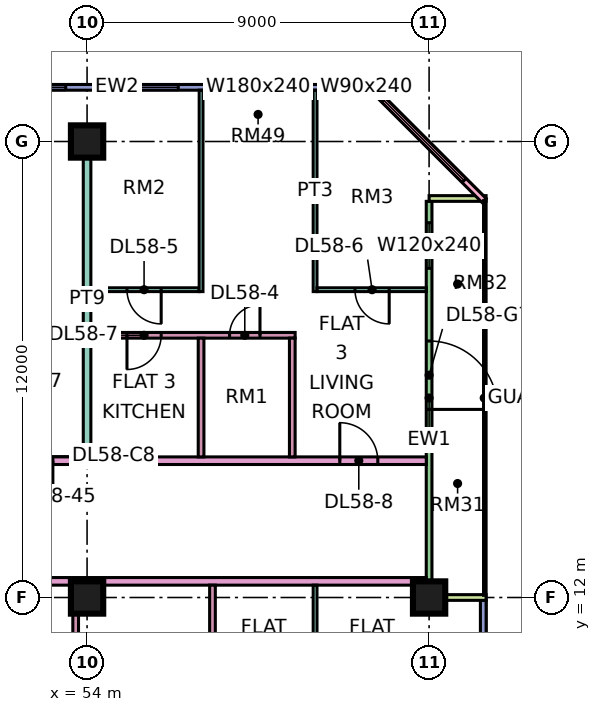
"""IFC4 building model, lengths in metres.
Left out: names, types, materials, properties, quantities, classifications, styles, units other than length and angle.
Written with IfcOpenShell. Run it as: python <this file> out.ifc"""

import sys

from ifc_helpers import new_model, si_unit, direction, frame, frame_2d, origin, origin_2d, place, context, subcontext, project, spatial, rectangle, extrude, element, fill, save


model = new_model("IFC4")
c1 = context("Model", 3, precision=1e-05, world=origin(), true_north=direction((0.0, 1.0)))
c2 = subcontext(c1, "Body", "Model", "MODEL_VIEW")
j1 = project(units=[si_unit("LENGTHUNIT", "METRE"), si_unit("PLANEANGLEUNIT", "RADIAN")], contexts=[c1])
p1 = place(None, origin())
s1 = spatial("IfcSite", under=j1, at=p1, CompositionType="ELEMENT")
p2 = place(p1, origin())
s2 = spatial("IfcBuilding", under=s1, at=p2, CompositionType="ELEMENT")
p3 = place(p2, frame((0.0, 0.0, 245.4)))
s3 = spatial("IfcBuildingStorey", under=s2, at=p3, CompositionType="ELEMENT", Elevation=245.4)
for number, where, z_axis, x_axis in (
    (1, (54.0, 12.0, 0.0), (0.0, 0.0, 1.0), (1.0, 0.0, 0.0)),
    (2, (54.0, 24.0, 0.0), (0.0, 0.0, 1.0), (1.0, 0.0, 0.0)),
    (3, (63.0, 12.0, 0.0), (0.0, 0.0, 1.0), (1.0, 0.0, 0.0)),
):
    element("IfcColumn", number, at=place(p3, frame(where, z_axis=z_axis, x_axis=x_axis)), inside=s3, PredefinedType="COLUMN", context=c2, shape_type="SweptSolid", body=[
        extrude(rectangle(XDim=0.85, YDim=0.85, at=origin_2d()), origin(), (0.0, 0.0, 1.0), 3.75),
    ])
p4 = place(p3, frame((61.5, 25.425, 0.0), z_axis=(0.0, 0.0, 1.0), x_axis=(-1.0, 0.0, 0.0)))
e4 = element("IfcWall", 4, at=p4, inside=s3, PredefinedType="SOLIDWALL", context=c2, shape_type="SweptSolid", body=[
    extrude(rectangle(XDim=13.425, YDim=0.15, at=frame_2d((6.712, 0.0))), origin(), (0.0, 0.0, 1.0), 3.35),
])
p5 = place(p4, frame((0.3, 0.0, 0.45)))
e5 = element("IfcOpeningElement", 5, at=p5, cuts=e4, PredefinedType="OPENING", context=c2, shape_type="SweptSolid", body=[
    extrude(rectangle(XDim=0.9, YDim=2.4, at=frame_2d((0.45, 1.2))), frame((0.0, 0.085, 0.0), z_axis=(0.0, -1.0, 0.0), x_axis=(1.0, 0.0, 0.0)), (0.0, 0.0, 1.0), 0.17),
])
p6 = place(p4, frame((2.1, 0.0, 0.45)))
e6 = element("IfcOpeningElement", 6, at=p6, cuts=e4, PredefinedType="OPENING", context=c2, shape_type="SweptSolid", body=[
    extrude(rectangle(XDim=1.8, YDim=2.4, at=frame_2d((0.9, 1.2))), frame((0.0, 0.085, 0.0), z_axis=(0.0, -1.0, 0.0), x_axis=(1.0, 0.0, 0.0)), (0.0, 0.0, 1.0), 0.17),
])
p7 = place(p4, frame((5.1, 0.0, 0.45)))
e7 = element("IfcOpeningElement", 7, at=p7, cuts=e4, PredefinedType="OPENING", context=c2, shape_type="SweptSolid", body=[
    extrude(rectangle(XDim=1.8, YDim=2.4, at=frame_2d((0.9, 1.2))), frame((0.0, 0.085, 0.0), z_axis=(0.0, -1.0, 0.0), x_axis=(1.0, 0.0, 0.0)), (0.0, 0.0, 1.0), 0.17),
])
p8 = place(p4, frame((8.062, 0.0, 0.45)))
e8 = element("IfcOpeningElement", 8, at=p8, cuts=e4, PredefinedType="OPENING", context=c2, shape_type="SweptSolid", body=[
    extrude(rectangle(XDim=4.8, YDim=2.4, at=frame_2d((2.4, 1.2))), frame((0.0, 0.085, 0.0), z_axis=(0.0, -1.0, 0.0), x_axis=(1.0, 0.0, 0.0)), (0.0, 0.0, 1.0), 0.17),
])
p9 = place(p3, frame((64.425, 1.5, 0.0), z_axis=(0.0, 0.0, 1.0), x_axis=(0.0, 1.0, 0.0)))
e9 = element("IfcWall", 9, at=p9, inside=s3, PredefinedType="SOLIDWALL", context=c2, shape_type="SweptSolid", body=[
    extrude(rectangle(XDim=10.425, YDim=0.15, at=frame_2d((5.212, 0.0))), origin(), (0.0, 0.0, 1.0), 3.35),
])
p10 = place(p9, frame((0.663, 0.0, 0.45)))
e10 = element("IfcOpeningElement", 10, at=p10, cuts=e9, PredefinedType="OPENING", context=c2, shape_type="SweptSolid", body=[
    extrude(rectangle(XDim=4.8, YDim=2.4, at=frame_2d((2.4, 1.2))), frame((0.0, 0.085, 0.0), z_axis=(0.0, -1.0, 0.0), x_axis=(1.0, 0.0, 0.0)), (0.0, 0.0, 1.0), 0.17),
])
p11 = place(p3, frame((63.0, 12.075, 0.0), z_axis=(0.0, 0.0, 1.0), x_axis=(0.0, 1.0, 0.0)))
e11 = element("IfcWall", 11, at=p11, inside=s3, PredefinedType="SOLIDWALL", context=c2, shape_type="SweptSolid", body=[
    extrude(rectangle(XDim=10.35, YDim=0.15, at=frame_2d((5.175, 0.0))), origin(), (0.0, 0.0, 1.0), 3.35),
])
p12 = place(p11, frame((4.875, 0.0, 0.0)))
e12 = element("IfcOpeningElement", 12, at=p12, cuts=e11, PredefinedType="OPENING", context=c2, shape_type="SweptSolid", body=[
    extrude(rectangle(XDim=1.8, YDim=2.4, at=frame_2d((0.9, 1.2))), frame((0.0, 0.085, 0.0), z_axis=(0.0, -1.0, 0.0), x_axis=(1.0, 0.0, 0.0)), (0.0, 0.0, 1.0), 0.17),
])
p13 = place(p11, frame((8.587, 0.0, 0.45)))
e13 = element("IfcOpeningElement", 13, at=p13, cuts=e11, PredefinedType="OPENING", context=c2, shape_type="SweptSolid", body=[
    extrude(rectangle(XDim=1.2, YDim=2.4, at=frame_2d((0.6, 1.2))), frame((0.0, 0.085, 0.0), z_axis=(0.0, -1.0, 0.0), x_axis=(1.0, 0.0, 0.0)), (0.0, 0.0, 1.0), 0.17),
])
for number, where, z_axis, x_axis in (
    (14, (64.5, 12.0, 0.0), (0.0, 0.0, 1.0), (-1.0, 0.0, 0.0)),
    (15, (64.5, 22.5, 0.0), (0.0, 0.0, 1.0), (-1.0, 0.0, 0.0)),
):
    element("IfcWall", number, at=place(p3, frame(where, z_axis=z_axis, x_axis=x_axis)), inside=s3, PredefinedType="SOLIDWALL", context=c2, shape_type="SweptSolid", body=[
        extrude(rectangle(XDim=1.5, YDim=0.15, at=frame_2d((0.75, 0.0))), origin(), (0.0, 0.0, 1.0), 3.35),
    ])
p14 = place(p3, frame((64.447, 22.447, 0.0), z_axis=(0.0, 0.0, 1.0), x_axis=(-0.707106781187, 0.707106781187, 0.0)))
e16 = element("IfcWall", 16, at=p14, inside=s3, PredefinedType="SOLIDWALL", context=c2, shape_type="SweptSolid", body=[
    extrude(rectangle(XDim=4.243, YDim=0.15, at=frame_2d((2.121, 0.0))), origin(), (0.0, 0.0, 1.0), 3.35),
])
p15 = place(p14, frame((0.744, 0.0, 0.45)))
e17 = element("IfcOpeningElement", 17, at=p15, cuts=e16, PredefinedType="OPENING", context=c2, shape_type="SweptSolid", body=[
    extrude(rectangle(XDim=3.0, YDim=2.4, at=frame_2d((1.5, 1.2))), frame((0.0, 0.085, 0.0), z_axis=(0.0, -1.0, 0.0), x_axis=(1.0, 0.0, 0.0)), (0.0, 0.0, 1.0), 0.17),
])
p16 = place(p3, frame((40.65, 12.425, 0.0), z_axis=(0.0, 0.0, 1.0), x_axis=(1.0, 0.0, 0.0)))
e18 = element("IfcWall", 18, at=p16, inside=s3, PredefinedType="PARTITIONING", context=c2, shape_type="SweptSolid", body=[
    extrude(rectangle(XDim=22.276, YDim=0.2, at=frame_2d((11.138, 0.0))), origin(), (0.0, 0.0, 1.0), 3.35),
])
p17 = place(p16, frame((8.7, 0.0, 0.0)))
e19 = element("IfcOpeningElement", 19, at=p17, cuts=e18, PredefinedType="OPENING", context=c2, shape_type="SweptSolid", body=[
    extrude(rectangle(XDim=1.0, YDim=2.1, at=frame_2d((0.5, 1.05))), frame((0.0, 0.11, 0.0), z_axis=(0.0, -1.0, 0.0), x_axis=(1.0, 0.0, 0.0)), (0.0, 0.0, 1.0), 0.22),
])
p18 = place(p16, frame((1.05, 0.0, 0.0)))
e20 = element("IfcOpeningElement", 20, at=p18, cuts=e18, PredefinedType="OPENING", context=c2, shape_type="SweptSolid", body=[
    extrude(rectangle(XDim=1.0, YDim=2.1, at=frame_2d((0.5, 1.05))), frame((0.0, 0.11, 0.0), z_axis=(0.0, -1.0, 0.0), x_axis=(1.0, 0.0, 0.0)), (0.0, 0.0, 1.0), 0.22),
])
p19 = place(p3, frame((51.225, 15.6, 0.0), z_axis=(0.0, 0.0, 1.0), x_axis=(1.0, 0.0, 0.0)))
e21 = element("IfcWall", 21, at=p19, inside=s3, PredefinedType="PARTITIONING", context=c2, shape_type="SweptSolid", body=[
    extrude(rectangle(XDim=11.701, YDim=0.2, at=frame_2d((5.851, 0.0))), origin(), (0.0, 0.0, 1.0), 3.35),
])
p20 = place(p19, frame((9.425, 0.0, 0.0)))
e22 = element("IfcOpeningElement", 22, at=p20, cuts=e21, PredefinedType="OPENING", context=c2, shape_type="SweptSolid", body=[
    extrude(rectangle(XDim=1.0, YDim=2.1, at=frame_2d((0.5, 1.05))), frame((0.0, 0.11, 0.0), z_axis=(0.0, -1.0, 0.0), x_axis=(1.0, 0.0, 0.0)), (0.0, 0.0, 1.0), 0.22),
])
p21 = place(p19, frame((0.875, 0.0, 0.0)))
e23 = element("IfcOpeningElement", 23, at=p21, cuts=e21, PredefinedType="OPENING", context=c2, shape_type="SweptSolid", body=[
    extrude(rectangle(XDim=1.0, YDim=2.1, at=frame_2d((0.5, 1.05))), frame((0.0, 0.11, 0.0), z_axis=(0.0, -1.0, 0.0), x_axis=(1.0, 0.0, 0.0)), (0.0, 0.0, 1.0), 0.22),
])
p22 = place(p3, frame((53.7, 7.7, 0.0), z_axis=(0.0, 0.0, 1.0), x_axis=(0.0, 1.0, 0.0)))
e24 = element("IfcWall", 24, at=p22, inside=s3, PredefinedType="PARTITIONING", context=c2, shape_type="SweptSolid", body=[
    extrude(rectangle(XDim=4.625, YDim=0.15, at=frame_2d((2.312, 0.0))), origin(), (0.0, 0.0, 1.0), 3.35),
])
p23 = place(p3, frame((54.0, 15.7, 0.0), z_axis=(0.0, 0.0, 1.0), x_axis=(0.0, 1.0, 0.0)))
e25 = element("IfcWall", 25, at=p23, inside=s3, PredefinedType="PARTITIONING", context=c2, shape_type="SweptSolid", body=[
    extrude(rectangle(XDim=8.3, YDim=0.2, at=frame_2d((4.15, 0.0))), origin(), (0.0, 0.0, 1.0), 3.35),
])
p24 = place(p3, frame((54.1, 18.9, 0.0), z_axis=(0.0, 0.0, 1.0), x_axis=(1.0, 0.0, 0.0)))
e26 = element("IfcWall", 26, at=p24, inside=s3, PredefinedType="PARTITIONING", context=c2, shape_type="SweptSolid", body=[
    extrude(rectangle(XDim=5.375, YDim=0.15, at=frame_2d((2.688, 0.0))), origin(), (0.0, 0.0, 1.0), 3.35),
])
p25 = place(p24, frame((3.65, 0.0, 0.0)))
e27 = element("IfcOpeningElement", 27, at=p25, cuts=e26, PredefinedType="OPENING", context=c2, shape_type="SweptSolid", body=[
    extrude(rectangle(XDim=0.8, YDim=2.1, at=frame_2d((0.4, 1.05))), frame((0.0, 0.085, 0.0), z_axis=(0.0, -1.0, 0.0), x_axis=(1.0, 0.0, 0.0)), (0.0, 0.0, 1.0), 0.17),
])
p26 = place(p24, frame((0.95, 0.0, 0.0)))
e28 = element("IfcOpeningElement", 28, at=p26, cuts=e26, PredefinedType="OPENING", context=c2, shape_type="SweptSolid", body=[
    extrude(rectangle(XDim=0.9, YDim=2.1, at=frame_2d((0.45, 1.05))), frame((0.0, 0.085, 0.0), z_axis=(0.0, -1.0, 0.0), x_axis=(1.0, 0.0, 0.0)), (0.0, 0.0, 1.0), 0.17),
])
p27 = place(p3, frame((54.1, 20.1, 0.0), z_axis=(0.0, 0.0, 1.0), x_axis=(1.0, 0.0, 0.0)))
e29 = element("IfcWall", 29, at=p27, inside=s3, PredefinedType="PARTITIONING", context=c2, shape_type="SweptSolid", body=[
    extrude(rectangle(XDim=2.85, YDim=0.1, at=frame_2d((1.425, 0.0))), origin(), (0.0, 0.0, 1.0), 3.35),
])
p28 = place(p27, frame((0.95, 0.0, 0.0)))
e30 = element("IfcOpeningElement", 30, at=p28, cuts=e29, PredefinedType="OPENING", context=c2, shape_type="SweptSolid", body=[
    extrude(rectangle(XDim=0.9, YDim=2.1, at=frame_2d((0.45, 1.05))), frame((0.0, 0.06, 0.0), z_axis=(0.0, -1.0, 0.0), x_axis=(1.0, 0.0, 0.0)), (0.0, 0.0, 1.0), 0.12),
])
p29 = place(p3, frame((57.0, 15.7, 0.0), z_axis=(0.0, 0.0, 1.0), x_axis=(0.0, 1.0, 0.0)))
e31 = element("IfcWall", 31, at=p29, inside=s3, PredefinedType="PARTITIONING", context=c2, shape_type="SweptSolid", body=[
    extrude(rectangle(XDim=3.125, YDim=0.15, at=frame_2d((1.562, 0.0))), origin(), (0.0, 0.0, 1.0), 3.35),
])
p30 = place(p3, frame((57.0, 20.05, 0.0), z_axis=(0.0, 0.0, 1.0), x_axis=(0.0, 1.0, 0.0)))
e32 = element("IfcWall", 32, at=p30, inside=s3, PredefinedType="PARTITIONING", context=c2, shape_type="SweptSolid", body=[
    extrude(rectangle(XDim=5.3, YDim=0.1, at=frame_2d((2.65, 0.0))), origin(), (0.0, 0.0, 1.0), 3.35),
])
p31 = place(p3, frame((57.3, 7.7, 0.0), z_axis=(0.0, 0.0, 1.0), x_axis=(0.0, 1.0, 0.0)))
e33 = element("IfcWall", 33, at=p31, inside=s3, PredefinedType="PARTITIONING", context=c2, shape_type="SweptSolid", body=[
    extrude(rectangle(XDim=4.625, YDim=0.15, at=frame_2d((2.312, 0.0))), origin(), (0.0, 0.0, 1.0), 3.35),
])
p32 = place(p3, frame((59.4, 15.7, 0.0), z_axis=(0.0, 0.0, 1.0), x_axis=(0.0, 1.0, 0.0)))
e34 = element("IfcWall", 34, at=p32, inside=s3, PredefinedType="PARTITIONING", context=c2, shape_type="SweptSolid", body=[
    extrude(rectangle(XDim=3.125, YDim=0.15, at=frame_2d((1.562, 0.0))), origin(), (0.0, 0.0, 1.0), 3.35),
])
p33 = place(p3, frame((60.0, 7.7, 0.0), z_axis=(0.0, 0.0, 1.0), x_axis=(0.0, 1.0, 0.0)))
e35 = element("IfcWall", 35, at=p33, inside=s3, PredefinedType="PARTITIONING", context=c2, shape_type="SweptSolid", body=[
    extrude(rectangle(XDim=4.625, YDim=0.1, at=frame_2d((2.312, 0.0))), origin(), (0.0, 0.0, 1.0), 3.35),
])
p34 = place(p3, frame((60.0, 20.05, 0.0), z_axis=(0.0, 0.0, 1.0), x_axis=(0.0, 1.0, 0.0)))
e36 = element("IfcWall", 36, at=p34, inside=s3, PredefinedType="PARTITIONING", context=c2, shape_type="SweptSolid", body=[
    extrude(rectangle(XDim=5.3, YDim=0.1, at=frame_2d((2.65, 0.0))), origin(), (0.0, 0.0, 1.0), 3.35),
])
p35 = place(p3, frame((60.05, 20.1, 0.0), z_axis=(0.0, 0.0, 1.0), x_axis=(1.0, 0.0, 0.0)))
e37 = element("IfcWall", 37, at=p35, inside=s3, PredefinedType="PARTITIONING", context=c2, shape_type="SweptSolid", body=[
    extrude(rectangle(XDim=2.876, YDim=0.1, at=frame_2d((1.438, 0.0))), origin(), (0.0, 0.0, 1.0), 3.35),
])
p36 = place(p35, frame((1.0, 0.0, 0.0)))
e38 = element("IfcOpeningElement", 38, at=p36, cuts=e37, PredefinedType="OPENING", context=c2, shape_type="SweptSolid", body=[
    extrude(rectangle(XDim=0.9, YDim=2.1, at=frame_2d((0.45, 1.05))), frame((0.0, 0.06, 0.0), z_axis=(0.0, -1.0, 0.0), x_axis=(1.0, 0.0, 0.0)), (0.0, 0.0, 1.0), 0.12),
])
p37 = place(p5, origin())
e39 = element("IfcWindow", 39, at=p37, inside=s3, PartitioningType="SINGLE_PANEL", PredefinedType="WINDOW", context=c2, shape_type="SweptSolid", body=[
    extrude(rectangle(XDim=0.9, YDim=2.4, at=frame_2d((0.45, 1.2))), frame((0.0, 0.03, 0.0), z_axis=(0.0, -1.0, 0.0), x_axis=(1.0, 0.0, 0.0)), (0.0, 0.0, 1.0), 0.06),
])
fill(e5, e39)
p38 = place(p6, origin())
e40 = element("IfcWindow", 40, at=p38, inside=s3, PartitioningType="SINGLE_PANEL", PredefinedType="WINDOW", context=c2, shape_type="SweptSolid", body=[
    extrude(rectangle(XDim=1.8, YDim=2.4, at=frame_2d((0.9, 1.2))), frame((0.0, 0.03, 0.0), z_axis=(0.0, -1.0, 0.0), x_axis=(1.0, 0.0, 0.0)), (0.0, 0.0, 1.0), 0.06),
])
fill(e6, e40)
p39 = place(p7, origin())
e41 = element("IfcWindow", 41, at=p39, inside=s3, PartitioningType="SINGLE_PANEL", PredefinedType="WINDOW", context=c2, shape_type="SweptSolid", body=[
    extrude(rectangle(XDim=1.8, YDim=2.4, at=frame_2d((0.9, 1.2))), frame((0.0, 0.03, 0.0), z_axis=(0.0, -1.0, 0.0), x_axis=(1.0, 0.0, 0.0)), (0.0, 0.0, 1.0), 0.06),
])
fill(e7, e41)
p40 = place(p8, origin())
e42 = element("IfcWindow", 42, at=p40, inside=s3, PartitioningType="SINGLE_PANEL", PredefinedType="WINDOW", context=c2, shape_type="SweptSolid", body=[
    extrude(rectangle(XDim=4.8, YDim=2.4, at=frame_2d((2.4, 1.2))), frame((0.0, 0.03, 0.0), z_axis=(0.0, -1.0, 0.0), x_axis=(1.0, 0.0, 0.0)), (0.0, 0.0, 1.0), 0.06),
])
fill(e8, e42)
p41 = place(p12, frame((1.8, 0.0, 0.0), z_axis=(0.0, 0.0, 1.0), x_axis=(-1.0, 0.0, 0.0)))
e43 = element("IfcDoor", 43, at=p41, inside=s3, OperationType="DOUBLE_DOOR_SINGLE_SWING", PredefinedType="DOOR", context=c2, shape_type="SweptSolid", body=[
    extrude(rectangle(XDim=1.8, YDim=2.4, at=frame_2d((0.9, 1.2))), frame((0.0, 0.025, 0.0), z_axis=(0.0, -1.0, 0.0), x_axis=(1.0, 0.0, 0.0)), (0.0, 0.0, 1.0), 0.05),
])
fill(e12, e43)
p42 = place(p13, origin())
e44 = element("IfcWindow", 44, at=p42, inside=s3, PartitioningType="SINGLE_PANEL", PredefinedType="WINDOW", context=c2, shape_type="SweptSolid", body=[
    extrude(rectangle(XDim=1.2, YDim=2.4, at=frame_2d((0.6, 1.2))), frame((0.0, 0.03, 0.0), z_axis=(0.0, -1.0, 0.0), x_axis=(1.0, 0.0, 0.0)), (0.0, 0.0, 1.0), 0.06),
])
fill(e13, e44)
p43 = place(p15, origin())
e45 = element("IfcWindow", 45, at=p43, inside=s3, PartitioningType="SINGLE_PANEL", PredefinedType="WINDOW", context=c2, shape_type="SweptSolid", body=[
    extrude(rectangle(XDim=3.0, YDim=2.4, at=frame_2d((1.5, 1.2))), frame((0.0, 0.03, 0.0), z_axis=(0.0, -1.0, 0.0), x_axis=(1.0, 0.0, 0.0)), (0.0, 0.0, 1.0), 0.06),
])
fill(e17, e45)
p44 = place(p25, frame((0.8, 0.0, 0.0), z_axis=(0.0, 0.0, 1.0), x_axis=(-1.0, 0.0, 0.0)))
e46 = element("IfcDoor", 46, at=p44, inside=s3, OperationType="SINGLE_SWING_RIGHT", PredefinedType="DOOR", context=c2, shape_type="SweptSolid", body=[
    extrude(rectangle(XDim=0.8, YDim=2.1, at=frame_2d((0.4, 1.05))), frame((0.0, 0.025, 0.0), z_axis=(0.0, -1.0, 0.0), x_axis=(1.0, 0.0, 0.0)), (0.0, 0.0, 1.0), 0.05),
])
fill(e27, e46)
p45 = place(p28, origin())
e47 = element("IfcDoor", 47, at=p45, inside=s3, OperationType="SINGLE_SWING_RIGHT", PredefinedType="DOOR", context=c2, shape_type="SweptSolid", body=[
    extrude(rectangle(XDim=0.9, YDim=2.1, at=frame_2d((0.45, 1.05))), frame((0.0, 0.025, 0.0), z_axis=(0.0, -1.0, 0.0), x_axis=(1.0, 0.0, 0.0)), (0.0, 0.0, 1.0), 0.05),
])
fill(e30, e47)
p46 = place(p36, origin())
e48 = element("IfcDoor", 48, at=p46, inside=s3, OperationType="SINGLE_SWING_RIGHT", PredefinedType="DOOR", context=c2, shape_type="SweptSolid", body=[
    extrude(rectangle(XDim=0.9, YDim=2.1, at=frame_2d((0.45, 1.05))), frame((0.0, 0.025, 0.0), z_axis=(0.0, -1.0, 0.0), x_axis=(1.0, 0.0, 0.0)), (0.0, 0.0, 1.0), 0.05),
])
fill(e38, e48)
p47 = place(p26, frame((0.9, 0.0, 0.0), z_axis=(0.0, 0.0, 1.0), x_axis=(-1.0, 0.0, 0.0)))
e49 = element("IfcDoor", 49, at=p47, inside=s3, OperationType="SINGLE_SWING_LEFT", PredefinedType="DOOR", context=c2, shape_type="SweptSolid", body=[
    extrude(rectangle(XDim=0.9, YDim=2.1, at=frame_2d((0.45, 1.05))), frame((0.0, 0.025, 0.0), z_axis=(0.0, -1.0, 0.0), x_axis=(1.0, 0.0, 0.0)), (0.0, 0.0, 1.0), 0.05),
])
fill(e28, e49)
p48 = place(p20, origin())
e50 = element("IfcDoor", 50, at=p48, inside=s3, OperationType="SINGLE_SWING_LEFT", PredefinedType="DOOR", context=c2, shape_type="SweptSolid", body=[
    extrude(rectangle(XDim=1.0, YDim=2.1, at=frame_2d((0.5, 1.05))), frame((0.0, 0.025, 0.0), z_axis=(0.0, -1.0, 0.0), x_axis=(1.0, 0.0, 0.0)), (0.0, 0.0, 1.0), 0.05),
])
fill(e22, e50)
p49 = place(p21, origin())
e51 = element("IfcDoor", 51, at=p49, inside=s3, OperationType="SINGLE_SWING_RIGHT", PredefinedType="DOOR", context=c2, shape_type="SweptSolid", body=[
    extrude(rectangle(XDim=1.0, YDim=2.1, at=frame_2d((0.5, 1.05))), frame((0.0, 0.025, 0.0), z_axis=(0.0, -1.0, 0.0), x_axis=(1.0, 0.0, 0.0)), (0.0, 0.0, 1.0), 0.05),
])
fill(e23, e51)
save(model, sys.argv[1])
